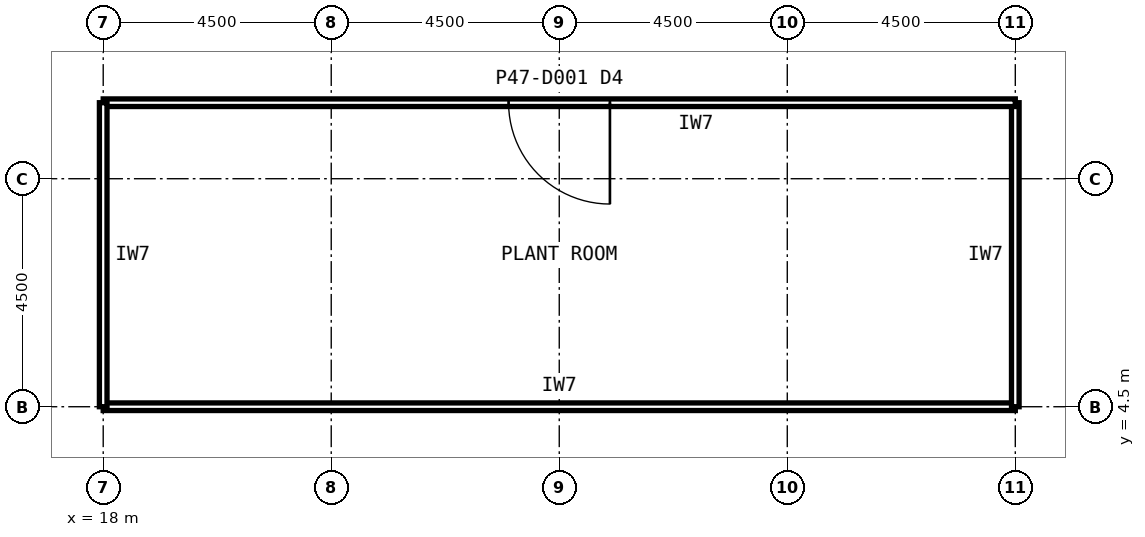
"""IFC4 building model, lengths in metres.
Left out: names, types, materials, properties, quantities, classifications, styles, units other than length and angle.
Written with IfcOpenShell. Run it as: python <this file> out.ifc"""

import sys

from ifc_helpers import new_model, si_unit, direction, frame, frame_2d, origin, place, context, subcontext, project, spatial, rectangle, extrude, element, fill, save


model = new_model("IFC4")
c1 = context("Model", 3, precision=1e-05, world=origin(), true_north=direction((0.0, 1.0)))
c2 = subcontext(c1, "Body", "Model", "MODEL_VIEW")
j1 = project(units=[si_unit("LENGTHUNIT", "METRE"), si_unit("PLANEANGLEUNIT", "RADIAN")], contexts=[c1])
p1 = place(None, origin())
s1 = spatial("IfcSite", under=j1, at=p1, CompositionType="ELEMENT")
p2 = place(p1, origin())
s2 = spatial("IfcBuilding", under=s1, at=p2, CompositionType="ELEMENT")
p3 = place(p2, frame((0.0, 0.0, 199.6)))
s3 = spatial("IfcBuildingStorey", under=s2, at=p3, CompositionType="ELEMENT", Elevation=199.6)
p4 = place(p3, frame((17.739, -0.63, 0.0), z_axis=(0.0, 0.0, 1.0), x_axis=(-0.707106781187, 0.707106781187, 0.0)))
e1 = element("IfcWall", 1, at=p4, inside=s3, PredefinedType="SOLIDWALL", context=c2, shape_type="SweptSolid", body=[
    extrude(rectangle(XDim=25.978, YDim=0.3, at=frame_2d((12.989, 0.0))), origin(), (0.0, 0.0, 1.0), 6.0),
])
p5 = place(p4, frame((0.424, 0.0, 1.2)))
e2 = element("IfcOpeningElement", 2, at=p5, cuts=e1, PredefinedType="OPENING", context=c2, shape_type="SweptSolid", body=[
    extrude(rectangle(XDim=2.4, YDim=3.0, at=frame_2d((1.2, 1.5))), frame((0.0, 0.16, 0.0), z_axis=(0.0, -1.0, 0.0), x_axis=(1.0, 0.0, 0.0)), (0.0, 0.0, 1.0), 0.32),
])
p6 = place(p4, frame((3.671, 0.0, 1.2)))
e3 = element("IfcOpeningElement", 3, at=p6, cuts=e1, PredefinedType="OPENING", context=c2, shape_type="SweptSolid", body=[
    extrude(rectangle(XDim=2.4, YDim=3.0, at=frame_2d((1.2, 1.5))), frame((0.0, 0.16, 0.0), z_axis=(0.0, -1.0, 0.0), x_axis=(1.0, 0.0, 0.0)), (0.0, 0.0, 1.0), 0.32),
])
p7 = place(p4, frame((6.918, 0.0, 1.2)))
e4 = element("IfcOpeningElement", 4, at=p7, cuts=e1, PredefinedType="OPENING", context=c2, shape_type="SweptSolid", body=[
    extrude(rectangle(XDim=2.4, YDim=3.0, at=frame_2d((1.2, 1.5))), frame((0.0, 0.16, 0.0), z_axis=(0.0, -1.0, 0.0), x_axis=(1.0, 0.0, 0.0)), (0.0, 0.0, 1.0), 0.32),
])
p8 = place(p4, frame((10.165, 0.0, 1.2)))
e5 = element("IfcOpeningElement", 5, at=p8, cuts=e1, PredefinedType="OPENING", context=c2, shape_type="SweptSolid", body=[
    extrude(rectangle(XDim=2.4, YDim=3.0, at=frame_2d((1.2, 1.5))), frame((0.0, 0.16, 0.0), z_axis=(0.0, -1.0, 0.0), x_axis=(1.0, 0.0, 0.0)), (0.0, 0.0, 1.0), 0.32),
])
p9 = place(p4, frame((13.412, 0.0, 1.2)))
e6 = element("IfcOpeningElement", 6, at=p9, cuts=e1, PredefinedType="OPENING", context=c2, shape_type="SweptSolid", body=[
    extrude(rectangle(XDim=2.4, YDim=3.0, at=frame_2d((1.2, 1.5))), frame((0.0, 0.16, 0.0), z_axis=(0.0, -1.0, 0.0), x_axis=(1.0, 0.0, 0.0)), (0.0, 0.0, 1.0), 0.32),
])
p10 = place(p4, frame((16.66, 0.0, 1.2)))
e7 = element("IfcOpeningElement", 7, at=p10, cuts=e1, PredefinedType="OPENING", context=c2, shape_type="SweptSolid", body=[
    extrude(rectangle(XDim=2.4, YDim=3.0, at=frame_2d((1.2, 1.5))), frame((0.0, 0.16, 0.0), z_axis=(0.0, -1.0, 0.0), x_axis=(1.0, 0.0, 0.0)), (0.0, 0.0, 1.0), 0.32),
])
p11 = place(p4, frame((19.907, 0.0, 1.2)))
e8 = element("IfcOpeningElement", 8, at=p11, cuts=e1, PredefinedType="OPENING", context=c2, shape_type="SweptSolid", body=[
    extrude(rectangle(XDim=2.4, YDim=3.0, at=frame_2d((1.2, 1.5))), frame((0.0, 0.16, 0.0), z_axis=(0.0, -1.0, 0.0), x_axis=(1.0, 0.0, 0.0)), (0.0, 0.0, 1.0), 0.32),
])
p12 = place(p4, frame((23.154, 0.0, 1.2)))
e9 = element("IfcOpeningElement", 9, at=p12, cuts=e1, PredefinedType="OPENING", context=c2, shape_type="SweptSolid", body=[
    extrude(rectangle(XDim=2.4, YDim=3.0, at=frame_2d((1.2, 1.5))), frame((0.0, 0.16, 0.0), z_axis=(0.0, -1.0, 0.0), x_axis=(1.0, 0.0, 0.0)), (0.0, 0.0, 1.0), 0.32),
])
p13 = place(p3, frame((18.0, 4.5, 0.0), z_axis=(0.0, 0.0, 1.0), x_axis=(1.0, 0.0, 0.0)))
e10 = element("IfcWall", 10, at=p13, inside=s3, PredefinedType="PARTITIONING", context=c2, shape_type="SweptSolid", body=[
    extrude(rectangle(XDim=18.0, YDim=0.15, at=frame_2d((9.0, 0.0))), origin(), (0.0, 0.0, 1.0), 5.82),
])
p14 = place(p3, frame((36.0, 4.5, 0.0), z_axis=(0.0, 0.0, 1.0), x_axis=(0.0, 1.0, 0.0)))
e11 = element("IfcWall", 11, at=p14, inside=s3, PredefinedType="PARTITIONING", context=c2, shape_type="SweptSolid", body=[
    extrude(rectangle(XDim=6.0, YDim=0.15, at=frame_2d((3.0, 0.0))), origin(), (0.0, 0.0, 1.0), 4.72),
])
p15 = place(p3, frame((36.0, 10.5, 0.0), z_axis=(0.0, 0.0, 1.0), x_axis=(-1.0, 0.0, 0.0)))
e12 = element("IfcWall", 12, at=p15, inside=s3, PredefinedType="PARTITIONING", context=c2, shape_type="SweptSolid", body=[
    extrude(rectangle(XDim=18.0, YDim=0.15, at=frame_2d((9.0, 0.0))), origin(), (0.0, 0.0, 1.0), 5.82),
])
p16 = place(p15, frame((8.0, 0.0, 0.0)))
e13 = element("IfcOpeningElement", 13, at=p16, cuts=e12, PredefinedType="OPENING", context=c2, shape_type="SweptSolid", body=[
    extrude(rectangle(XDim=2.0, YDim=2.4, at=frame_2d((1.0, 1.2))), frame((0.0, 0.085, 0.0), z_axis=(0.0, -1.0, 0.0), x_axis=(1.0, 0.0, 0.0)), (0.0, 0.0, 1.0), 0.17),
])
p17 = place(p3, frame((18.0, 10.5, 0.0), z_axis=(0.0, 0.0, 1.0), x_axis=(0.0, -1.0, 0.0)))
e14 = element("IfcWall", 14, at=p17, inside=s3, PredefinedType="PARTITIONING", context=c2, shape_type="SweptSolid", body=[
    extrude(rectangle(XDim=6.0, YDim=0.15, at=frame_2d((3.0, 0.0))), origin(), (0.0, 0.0, 1.0), 4.72),
])
p18 = place(p16, origin())
e15 = element("IfcDoor", 15, at=p18, inside=s3, OperationType="SINGLE_SWING_LEFT", PredefinedType="DOOR", context=c2, shape_type="SweptSolid", body=[
    extrude(rectangle(XDim=2.0, YDim=2.4, at=frame_2d((1.0, 1.2))), frame((0.0, 0.025, 0.0), z_axis=(0.0, -1.0, 0.0), x_axis=(1.0, 0.0, 0.0)), (0.0, 0.0, 1.0), 0.05),
])
fill(e13, e15)
save(model, sys.argv[1])
